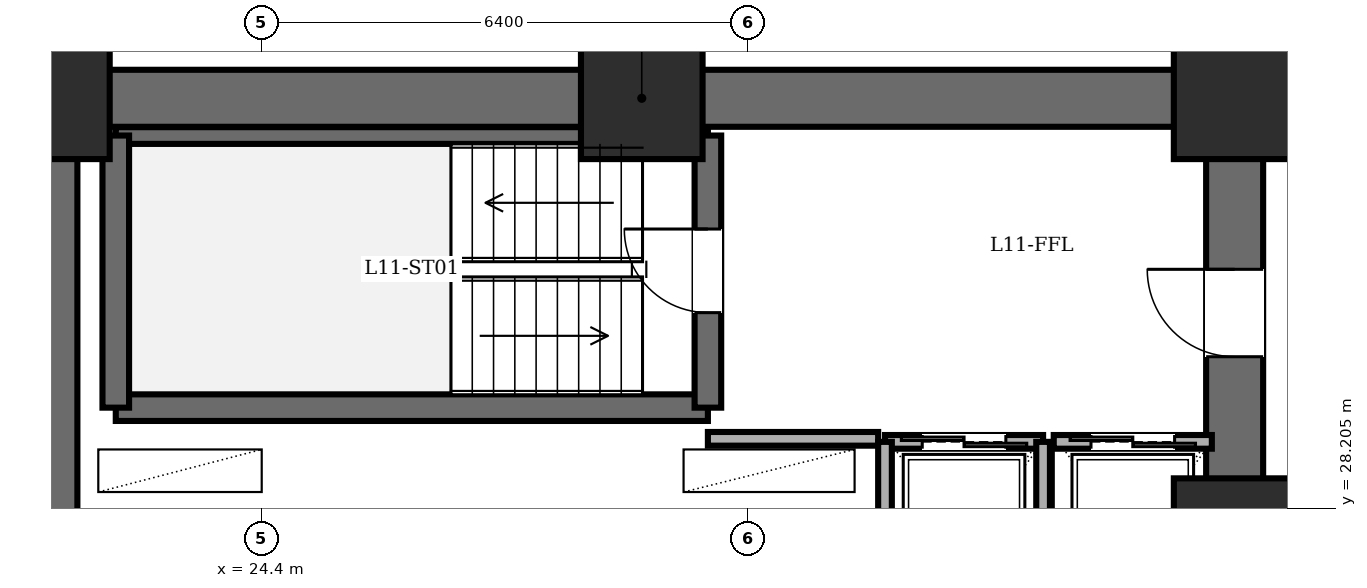
"""IFC4 building model, lengths in metres.
Left out: names, types, materials, properties, quantities, classifications, styles, units other than length and angle.
Written with IfcOpenShell. Run it as: python <this file> out.ifc"""

import sys

from ifc_helpers import new_model, si_unit, direction, frame, frame_2d, origin, origin_2d, place, context, subcontext, project, spatial, rectangle, extrude, element, fill, save


model = new_model("IFC4")
c1 = context("Model", 3, precision=1e-05, world=origin(), true_north=direction((0.0, 1.0)))
c2 = subcontext(c1, "Body", "Model", "MODEL_VIEW")
j1 = project(units=[si_unit("LENGTHUNIT", "METRE"), si_unit("PLANEANGLEUNIT", "RADIAN")], contexts=[c1])
p1 = place(None, origin())
s1 = spatial("IfcSite", under=j1, at=p1, CompositionType="ELEMENT")
p2 = place(p1, origin())
s2 = spatial("IfcBuilding", under=s1, at=p2, CompositionType="ELEMENT")
p3 = place(p2, frame((0.0, 0.0, 43.2)))
s3 = spatial("IfcBuildingStorey", under=s2, at=p3, CompositionType="ELEMENT", Elevation=43.2)
for number, where, z_axis, x_axis in (
    (1, (37.2, 27.8, 0.0), (0.0, 0.0, 1.0), (1.0, 0.0, 0.0)),
    (2, (37.2, 33.6, 0.0), (0.0, 0.0, 1.0), (1.0, 0.0, 0.0)),
    (3, (29.4, 33.6, 0.0), (0.0, 0.0, 1.0), (1.0, 0.0, 0.0)),
    (4, (21.6, 33.6, 0.0), (0.0, 0.0, 1.0), (1.0, 0.0, 0.0)),
):
    element("IfcColumn", number, at=place(p3, frame(where, z_axis=z_axis, x_axis=x_axis)), inside=s3, PredefinedType="COLUMN", context=c2, shape_type="SweptSolid", body=[
        extrude(rectangle(XDim=1.6, YDim=1.6, at=origin_2d()), origin(), (0.0, 0.0, 1.0), 3.6),
    ])
p4 = place(p3, frame((21.6, 14.4, 0.0), z_axis=(0.0, 0.0, 1.0), x_axis=(0.0, 1.0, 0.0)))
e5 = element("IfcWall", 5, at=p4, inside=s3, PredefinedType="SHEAR", context=c2, shape_type="SweptSolid", body=[
    extrude(rectangle(XDim=19.2, YDim=0.75, at=frame_2d((9.6, 0.0))), origin(), (0.0, 0.0, 1.0), 3.4),
])
p5 = place(p3, frame((21.6, 33.6, 0.0), z_axis=(0.0, 0.0, 1.0), x_axis=(1.0, 0.0, 0.0)))
e6 = element("IfcWall", 6, at=p5, inside=s3, PredefinedType="SHEAR", context=c2, shape_type="SweptSolid", body=[
    extrude(rectangle(XDim=15.6, YDim=0.75, at=frame_2d((7.8, 0.0))), origin(), (0.0, 0.0, 1.0), 3.4),
])
p6 = place(p3, frame((37.2, 14.4, 0.0), z_axis=(0.0, 0.0, 1.0), x_axis=(0.0, 1.0, 0.0)))
e7 = element("IfcWall", 7, at=p6, inside=s3, PredefinedType="SHEAR", context=c2, shape_type="SweptSolid", body=[
    extrude(rectangle(XDim=19.2, YDim=0.75, at=frame_2d((9.6, 0.0))), origin(), (0.0, 0.0, 1.0), 3.4),
])
p7 = place(p6, frame((15.8, 0.0, 0.0)))
e8 = element("IfcOpeningElement", 8, at=p7, cuts=e7, PredefinedType="OPENING", context=c2, shape_type="SweptSolid", body=[
    extrude(rectangle(XDim=1.15, YDim=2.15, at=frame_2d((0.575, 1.075))), frame((0.0, 0.385, 0.0), z_axis=(0.0, -1.0, 0.0), x_axis=(1.0, 0.0, 0.0)), (0.0, 0.0, 1.0), 0.77),
])
p8 = place(p6, frame((3.6, 0.0, 0.0)))
e9 = element("IfcOpeningElement", 9, at=p8, cuts=e7, PredefinedType="OPENING", context=c2, shape_type="SweptSolid", body=[
    extrude(rectangle(XDim=1.1, YDim=2.15, at=frame_2d((0.55, 1.075))), frame((0.0, 0.385, 0.0), z_axis=(0.0, -1.0, 0.0), x_axis=(1.0, 0.0, 0.0)), (0.0, 0.0, 1.0), 0.77),
])
p9 = place(p6, frame((8.6, 0.0, 0.0)))
e10 = element("IfcOpeningElement", 10, at=p9, cuts=e7, PredefinedType="OPENING", context=c2, shape_type="SweptSolid", body=[
    extrude(rectangle(XDim=1.3, YDim=2.2, at=frame_2d((0.65, 1.1))), frame((0.0, 0.385, 0.0), z_axis=(0.0, -1.0, 0.0), x_axis=(1.0, 0.0, 0.0)), (0.0, 0.0, 1.0), 0.77),
])
p10 = place(p3, frame((22.48, 29.53, 0.0), z_axis=(0.0, 0.0, 1.0), x_axis=(1.0, 0.0, 0.0)))
e11 = element("IfcWall", 11, at=p10, inside=s3, PredefinedType="SOLIDWALL", context=c2, shape_type="SweptSolid", body=[
    extrude(rectangle(XDim=7.79, YDim=0.35, at=frame_2d((3.895, 0.0))), origin(), (0.0, 0.0, 1.0), 3.4),
])
p11 = place(p3, frame((22.48, 33.11, 0.0), z_axis=(0.0, 0.0, 1.0), x_axis=(1.0, 0.0, 0.0)))
e12 = element("IfcWall", 12, at=p11, inside=s3, PredefinedType="PARTITIONING", context=c2, shape_type="SweptSolid", body=[
    extrude(rectangle(XDim=7.79, YDim=0.22, at=frame_2d((3.895, 0.0))), origin(), (0.0, 0.0, 1.0), 3.4),
])
p12 = place(p3, frame((22.48, 29.53, 0.0), z_axis=(0.0, 0.0, 1.0), x_axis=(0.0, 1.0, 0.0)))
e13 = element("IfcWall", 13, at=p12, inside=s3, PredefinedType="SOLIDWALL", context=c2, shape_type="SweptSolid", body=[
    extrude(rectangle(XDim=3.58, YDim=0.35, at=frame_2d((1.79, 0.0))), origin(), (0.0, 0.0, 1.0), 3.4),
])
p13 = place(p3, frame((30.27, 29.53, 0.0), z_axis=(0.0, 0.0, 1.0), x_axis=(0.0, 1.0, 0.0)))
e14 = element("IfcWall", 14, at=p13, inside=s3, PredefinedType="SOLIDWALL", context=c2, shape_type="SweptSolid", body=[
    extrude(rectangle(XDim=3.58, YDim=0.35, at=frame_2d((1.79, 0.0))), origin(), (0.0, 0.0, 1.0), 3.4),
])
p14 = place(p13, frame((1.25, 0.0, 0.0)))
e15 = element("IfcOpeningElement", 15, at=p14, cuts=e14, PredefinedType="OPENING", context=c2, shape_type="SweptSolid", body=[
    extrude(rectangle(XDim=1.1, YDim=2.15, at=frame_2d((0.55, 1.075))), frame((0.0, 0.185, 0.0), z_axis=(0.0, -1.0, 0.0), x_axis=(1.0, 0.0, 0.0)), (0.0, 0.0, 1.0), 0.37),
])
p15 = place(p3, frame((30.27, 29.12, 0.0), z_axis=(0.0, 0.0, 1.0), x_axis=(1.0, 0.0, 0.0)))
e16 = element("IfcWall", 16, at=p15, inside=s3, PredefinedType="PARTITIONING", context=c2, shape_type="SweptSolid", body=[
    extrude(rectangle(XDim=2.24, YDim=0.18, at=frame_2d((1.12, 0.0))), origin(), (0.0, 0.0, 1.0), 3.4),
])
p16 = place(p3, frame((32.6, 29.08, 0.0), z_axis=(0.0, 0.0, 1.0), x_axis=(1.0, 0.0, 0.0)))
e17 = element("IfcWall", 17, at=p16, inside=s3, PredefinedType="PARTITIONING", context=c2, shape_type="SweptSolid", body=[
    extrude(rectangle(XDim=2.08, YDim=0.18, at=frame_2d((1.04, 0.0))), origin(), (0.0, 0.0, 1.0), 3.4),
])
p17 = place(p16, frame((0.49, 0.0, 0.0)))
e18 = element("IfcOpeningElement", 18, at=p17, cuts=e17, PredefinedType="OPENING", context=c2, shape_type="SweptSolid", body=[
    extrude(rectangle(XDim=1.1, YDim=2.2, at=frame_2d((0.55, 1.1))), frame((0.0, 0.1, 0.0), z_axis=(0.0, -1.0, 0.0), x_axis=(1.0, 0.0, 0.0)), (0.0, 0.0, 1.0), 0.2),
])
for number, where, z_axis, x_axis in (
    (19, (34.68, 26.35, 0.0), (0.0, 0.0, 1.0), (0.0, 1.0, 0.0)),
    (20, (32.6, 29.08, 0.0), (0.0, 0.0, 1.0), (0.0, -1.0, 0.0)),
):
    element("IfcWall", number, at=place(p3, frame(where, z_axis=z_axis, x_axis=x_axis)), inside=s3, PredefinedType="PARTITIONING", context=c2, shape_type="SweptSolid", body=[
        extrude(rectangle(XDim=2.73, YDim=0.18, at=frame_2d((1.365, 0.0))), origin(), (0.0, 0.0, 1.0), 3.4),
    ])
p18 = place(p3, frame((34.82, 29.08, 0.0), z_axis=(0.0, 0.0, 1.0), x_axis=(1.0, 0.0, 0.0)))
e21 = element("IfcWall", 21, at=p18, inside=s3, PredefinedType="PARTITIONING", context=c2, shape_type="SweptSolid", body=[
    extrude(rectangle(XDim=2.08, YDim=0.18, at=frame_2d((1.04, 0.0))), origin(), (0.0, 0.0, 1.0), 3.4),
])
p19 = place(p18, frame((0.49, 0.0, 0.0)))
e22 = element("IfcOpeningElement", 22, at=p19, cuts=e21, PredefinedType="OPENING", context=c2, shape_type="SweptSolid", body=[
    extrude(rectangle(XDim=1.1, YDim=2.2, at=frame_2d((0.55, 1.1))), frame((0.0, 0.1, 0.0), z_axis=(0.0, -1.0, 0.0), x_axis=(1.0, 0.0, 0.0)), (0.0, 0.0, 1.0), 0.2),
])
p20 = place(p14, origin())
e23 = element("IfcDoor", 23, at=p20, inside=s3, OperationType="SINGLE_SWING_RIGHT", PredefinedType="DOOR", context=c2, shape_type="SweptSolid", body=[
    extrude(rectangle(XDim=1.1, YDim=2.15, at=frame_2d((0.55, 1.075))), frame((0.0, 0.025, 0.0), z_axis=(0.0, -1.0, 0.0), x_axis=(1.0, 0.0, 0.0)), (0.0, 0.0, 1.0), 0.05),
])
fill(e15, e23)
p21 = place(p7, origin())
e24 = element("IfcDoor", 24, at=p21, inside=s3, OperationType="SINGLE_SWING_RIGHT", PredefinedType="DOOR", context=c2, shape_type="SweptSolid", body=[
    extrude(rectangle(XDim=1.15, YDim=2.15, at=frame_2d((0.575, 1.075))), frame((0.0, 0.025, 0.0), z_axis=(0.0, -1.0, 0.0), x_axis=(1.0, 0.0, 0.0)), (0.0, 0.0, 1.0), 0.05),
])
fill(e8, e24)
p22 = place(p17, origin())
e25 = element("IfcDoor", 25, at=p22, inside=s3, OperationType="DOUBLE_DOOR_SLIDING", PredefinedType="DOOR", context=c2, shape_type="SweptSolid", body=[
    extrude(rectangle(XDim=1.1, YDim=2.2, at=frame_2d((0.55, 1.1))), frame((0.0, 0.025, 0.0), z_axis=(0.0, -1.0, 0.0), x_axis=(1.0, 0.0, 0.0)), (0.0, 0.0, 1.0), 0.05),
])
fill(e18, e25)
p23 = place(p19, origin())
e26 = element("IfcDoor", 26, at=p23, inside=s3, OperationType="DOUBLE_DOOR_SLIDING", PredefinedType="DOOR", context=c2, shape_type="SweptSolid", body=[
    extrude(rectangle(XDim=1.1, YDim=2.2, at=frame_2d((0.55, 1.1))), frame((0.0, 0.025, 0.0), z_axis=(0.0, -1.0, 0.0), x_axis=(1.0, 0.0, 0.0)), (0.0, 0.0, 1.0), 0.05),
])
fill(e22, e26)
save(model, sys.argv[1])
